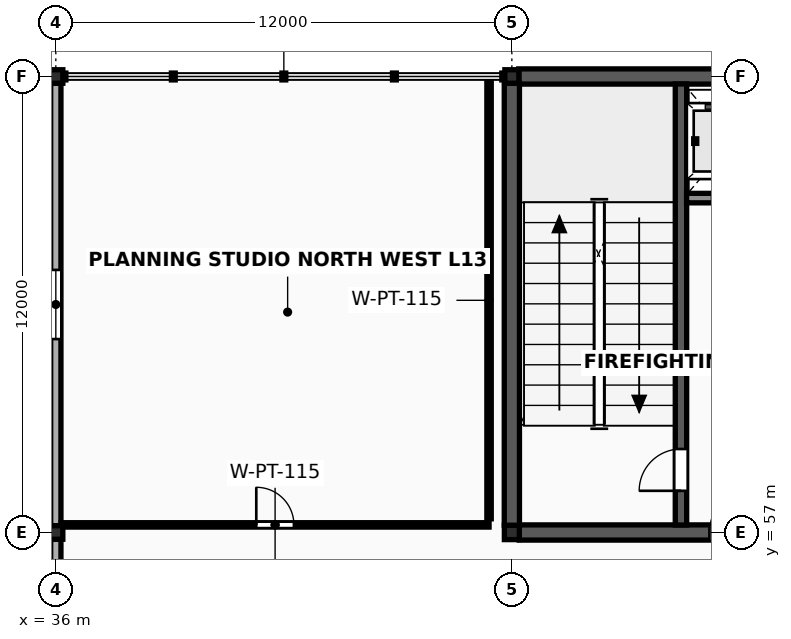
"""IFC4 building model, lengths in metres.
Left out: names, types, materials, properties, quantities, classifications, styles, units other than length and angle.
Written with IfcOpenShell. Run it as: python <this file> out.ifc"""

import sys

from ifc_helpers import new_model, si_unit, direction, frame, frame_2d, origin, origin_2d, place, context, subcontext, project, spatial, rectangle, i_section, extrude, element, fill, save


model = new_model("IFC4")
c1 = context("Model", 3, precision=1e-05, world=origin(), true_north=direction((0.0, 1.0)))
c2 = subcontext(c1, "Body", "Model", "MODEL_VIEW")
j1 = project(units=[si_unit("LENGTHUNIT", "METRE"), si_unit("PLANEANGLEUNIT", "RADIAN")], contexts=[c1])
p1 = place(None, origin())
s1 = spatial("IfcSite", under=j1, at=p1, CompositionType="ELEMENT")
p2 = place(p1, origin())
s2 = spatial("IfcBuilding", under=s1, at=p2, CompositionType="ELEMENT")
p3 = place(p2, frame((0.0, 0.0, 53.6)))
s3 = spatial("IfcBuildingStorey", under=s2, at=p3, CompositionType="ELEMENT", Elevation=53.6)
for number, where, z_axis, x_axis in (
    (1, (36.0, 57.0, 0.0), (0.0, 0.0, 1.0), (1.0, 0.0, 0.0)),
    (2, (36.0, 69.0, 0.0), (0.0, 0.0, 1.0), (1.0, 0.0, 0.0)),
):
    element("IfcColumn", number, at=place(p3, frame(where, z_axis=z_axis, x_axis=x_axis)), inside=s3, PredefinedType="COLUMN", context=c2, shape_type="SweptSolid", body=[
        extrude(i_section(OverallWidth=0.369, OverallDepth=0.356, WebThickness=0.011, FlangeThickness=0.018, FilletRadius=0.018, at=origin_2d()), origin(), (0.0, 0.0, 1.0), 4.0),
    ])
p4 = place(p3, frame((48.0, 57.0, 0.0), z_axis=(0.0, 0.0, 1.0), x_axis=(1.0, 0.0, 0.0)))
e3 = element("IfcColumn", 3, at=p4, inside=s3, PredefinedType="COLUMN", context=c2, shape_type="SweptSolid", body=[
    extrude(i_section(OverallWidth=0.394, OverallDepth=0.375, WebThickness=0.017, FlangeThickness=0.028, FilletRadius=0.018, at=origin_2d()), origin(), (0.0, 0.0, 1.0), 4.0),
])
p5 = place(p3, frame((48.0, 69.0, 0.0), z_axis=(0.0, 0.0, 1.0), x_axis=(1.0, 0.0, 0.0)))
e4 = element("IfcColumn", 4, at=p5, inside=s3, PredefinedType="COLUMN", context=c2, shape_type="SweptSolid", body=[
    extrude(i_section(OverallWidth=0.369, OverallDepth=0.356, WebThickness=0.011, FlangeThickness=0.018, FilletRadius=0.018, at=origin_2d()), origin(), (0.0, 0.0, 1.0), 4.0),
])
p6 = place(p3, frame((48.194, 57.0, 0.0), z_axis=(0.0, 0.0, 1.0), x_axis=(1.0, 0.0, 0.0)))
e5 = element("IfcWall", 5, at=p6, inside=s3, PredefinedType="SHEAR", context=c2, shape_type="SweptSolid", body=[
    extrude(rectangle(XDim=11.612, YDim=0.4, at=frame_2d((5.806, 0.0))), origin(), (0.0, 0.0, 1.0), 3.818),
])
p7 = place(p6, frame((5.006, 0.0, 0.0)))
e6 = element("IfcOpeningElement", 6, at=p7, cuts=e5, PredefinedType="OPENING", context=c2, shape_type="SweptSolid", body=[
    extrude(rectangle(XDim=1.2, YDim=2.2, at=frame_2d((0.6, 1.1))), frame((0.0, 0.215, 0.0), z_axis=(0.0, -1.0, 0.0), x_axis=(1.0, 0.0, 0.0)), (0.0, 0.0, 1.0), 0.43),
])
p8 = place(p6, frame((8.706, 0.0, 0.0)))
e7 = element("IfcOpeningElement", 7, at=p8, cuts=e5, PredefinedType="OPENING", context=c2, shape_type="SweptSolid", body=[
    extrude(rectangle(XDim=1.5, YDim=2.25, at=frame_2d((0.75, 1.125))), frame((0.0, 0.215, 0.0), z_axis=(0.0, -1.0, 0.0), x_axis=(1.0, 0.0, 0.0)), (0.0, 0.0, 1.0), 0.43),
])
p9 = place(p3, frame((48.181, 69.0, 0.0), z_axis=(0.0, 0.0, 1.0), x_axis=(1.0, 0.0, 0.0)))
e8 = element("IfcWall", 8, at=p9, inside=s3, PredefinedType="SHEAR", context=c2, shape_type="SweptSolid", body=[
    extrude(rectangle(XDim=11.637, YDim=0.4, at=frame_2d((5.819, 0.0))), origin(), (0.0, 0.0, 1.0), 3.818),
])
p10 = place(p3, frame((48.0, 57.185, 0.0), z_axis=(0.0, 0.0, 1.0), x_axis=(0.0, 1.0, 0.0)))
e9 = element("IfcWall", 9, at=p10, inside=s3, PredefinedType="SHEAR", context=c2, shape_type="SweptSolid", body=[
    extrude(rectangle(XDim=11.64, YDim=0.4, at=frame_2d((5.82, 0.0))), origin(), (0.0, 0.0, 1.0), 3.818),
])
p11 = place(p3, frame((52.45, 57.197, 0.0), z_axis=(0.0, 0.0, 1.0), x_axis=(0.0, 1.0, 0.0)))
e10 = element("IfcWall", 10, at=p11, inside=s3, PredefinedType="SHEAR", context=c2, shape_type="SweptSolid", body=[
    extrude(rectangle(XDim=11.606, YDim=0.3, at=frame_2d((5.803, 0.0))), origin(), (0.0, 0.0, 1.0), 3.818),
])
p12 = place(p11, frame((0.9, 0.0, 0.0)))
e11 = element("IfcOpeningElement", 11, at=p12, cuts=e10, PredefinedType="OPENING", context=c2, shape_type="SweptSolid", body=[
    extrude(rectangle(XDim=1.1, YDim=2.2, at=frame_2d((0.55, 1.1))), frame((0.0, 0.165, 0.0), z_axis=(0.0, -1.0, 0.0), x_axis=(1.0, 0.0, 0.0)), (0.0, 0.0, 1.0), 0.33),
])
p13 = place(p3, frame((52.597, 65.8, 0.0), z_axis=(0.0, 0.0, 1.0), x_axis=(1.0, 0.0, 0.0)))
e12 = element("IfcWall", 12, at=p13, inside=s3, PredefinedType="SOLIDWALL", context=c2, shape_type="SweptSolid", body=[
    extrude(rectangle(XDim=7.206, YDim=0.25, at=frame_2d((3.603, 0.0))), origin(), (0.0, 0.0, 1.0), 3.818),
])
p14 = place(p13, frame((0.653, 0.0, 0.0)))
e13 = element("IfcOpeningElement", 13, at=p14, cuts=e12, PredefinedType="OPENING", context=c2, shape_type="SweptSolid", body=[
    extrude(rectangle(XDim=1.1, YDim=2.24, at=frame_2d((0.55, 1.12))), frame((0.0, 0.14, 0.0), z_axis=(0.0, -1.0, 0.0), x_axis=(1.0, 0.0, 0.0)), (0.0, 0.0, 1.0), 0.28),
])
p15 = place(p13, frame((3.153, 0.0, 0.0)))
e14 = element("IfcOpeningElement", 14, at=p15, cuts=e12, PredefinedType="OPENING", context=c2, shape_type="SweptSolid", body=[
    extrude(rectangle(XDim=1.05, YDim=2.2, at=frame_2d((0.525, 1.1))), frame((0.0, 0.14, 0.0), z_axis=(0.0, -1.0, 0.0), x_axis=(1.0, 0.0, 0.0)), (0.0, 0.0, 1.0), 0.28),
])
p16 = place(p13, frame((5.528, 0.0, 0.0)))
e15 = element("IfcOpeningElement", 15, at=p16, cuts=e12, PredefinedType="OPENING", context=c2, shape_type="SweptSolid", body=[
    extrude(rectangle(XDim=1.05, YDim=2.2, at=frame_2d((0.525, 1.1))), frame((0.0, 0.14, 0.0), z_axis=(0.0, -1.0, 0.0), x_axis=(1.0, 0.0, 0.0)), (0.0, 0.0, 1.0), 0.28),
])
p17 = place(p3, frame((36.0, 45.176, 0.0), z_axis=(0.0, 0.0, 1.0), x_axis=(0.0, 1.0, 0.0)))
e16 = element("IfcWall", 16, at=p17, inside=s3, PredefinedType="SOLIDWALL", context=c2, shape_type="SweptSolid", body=[
    extrude(rectangle(XDim=11.648, YDim=0.27, at=frame_2d((5.824, 0.0))), origin(), (0.0, 0.0, 1.0), 3.271),
])
p18 = place(p17, frame((4.994, 0.0, 0.78)))
e17 = element("IfcOpeningElement", 17, at=p18, cuts=e16, PredefinedType="OPENING", context=c2, shape_type="SweptSolid", body=[
    extrude(rectangle(XDim=1.66, YDim=1.58, at=frame_2d((0.83, 0.79))), frame((0.0, 0.15, 0.0), z_axis=(0.0, -1.0, 0.0), x_axis=(1.0, 0.0, 0.0)), (0.0, 0.0, 1.0), 0.3),
])
p19 = place(p3, frame((36.0, 57.176, 0.0), z_axis=(0.0, 0.0, 1.0), x_axis=(0.0, 1.0, 0.0)))
e18 = element("IfcWall", 18, at=p19, inside=s3, PredefinedType="SOLIDWALL", context=c2, shape_type="SweptSolid", body=[
    extrude(rectangle(XDim=11.648, YDim=0.27, at=frame_2d((5.824, 0.0))), origin(), (0.0, 0.0, 1.0), 3.271),
])
p20 = place(p19, frame((4.914, 0.0, 0.78)))
e19 = element("IfcOpeningElement", 19, at=p20, cuts=e18, PredefinedType="OPENING", context=c2, shape_type="SweptSolid", body=[
    extrude(rectangle(XDim=1.82, YDim=1.58, at=frame_2d((0.91, 0.79))), frame((0.0, 0.15, 0.0), z_axis=(0.0, -1.0, 0.0), x_axis=(1.0, 0.0, 0.0)), (0.0, 0.0, 1.0), 0.3),
])
p21 = place(p3, frame((36.14, 57.2, 0.0), z_axis=(0.0, 0.0, 1.0), x_axis=(1.0, 0.0, 0.0)))
e20 = element("IfcWall", 20, at=p21, inside=s3, PredefinedType="PARTITIONING", context=c2, shape_type="SweptSolid", body=[
    extrude(rectangle(XDim=11.26, YDim=0.115, at=frame_2d((5.63, 0.0))), origin(), (0.0, 0.0, 1.0), 2.88),
])
p22 = place(p21, frame((5.135, 0.0, 0.0)))
e21 = element("IfcOpeningElement", 21, at=p22, cuts=e20, PredefinedType="OPENING", context=c2, shape_type="SweptSolid", body=[
    extrude(rectangle(XDim=0.99, YDim=2.15, at=frame_2d((0.495, 1.075))), frame((0.0, 0.073, 0.0), z_axis=(0.0, -1.0, 0.0), x_axis=(1.0, 0.0, 0.0)), (0.0, 0.0, 1.0), 0.145),
])
p23 = place(p3, frame((47.4, 57.36, 0.0), z_axis=(0.0, 0.0, 1.0), x_axis=(0.0, 1.0, 0.0)))
e22 = element("IfcWall", 22, at=p23, inside=s3, PredefinedType="PARTITIONING", context=c2, shape_type="SweptSolid", body=[
    extrude(rectangle(XDim=11.5, YDim=0.115, at=frame_2d((5.75, 0.0))), origin(), (0.0, 0.0, 1.0), 2.88),
])
p24 = place(p20, origin())
e23 = element("IfcWindow", 23, at=p24, inside=s3, PartitioningType="DOUBLE_PANEL_VERTICAL", PredefinedType="WINDOW", context=c2, shape_type="SweptSolid", body=[
    extrude(rectangle(XDim=1.82, YDim=1.58, at=frame_2d((0.91, 0.79))), frame((0.0, 0.03, 0.0), z_axis=(0.0, -1.0, 0.0), x_axis=(1.0, 0.0, 0.0)), (0.0, 0.0, 1.0), 0.06),
])
fill(e19, e23)
p25 = place(p12, origin())
e24 = element("IfcDoor", 24, at=p25, inside=s3, OperationType="SINGLE_SWING_LEFT", PredefinedType="DOOR", context=c2, shape_type="SweptSolid", body=[
    extrude(rectangle(XDim=1.1, YDim=2.2, at=frame_2d((0.55, 1.1))), frame((0.0, 0.025, 0.0), z_axis=(0.0, -1.0, 0.0), x_axis=(1.0, 0.0, 0.0)), (0.0, 0.0, 1.0), 0.05),
])
fill(e11, e24)
p26 = place(p7, origin())
e25 = element("IfcDoor", 25, at=p26, inside=s3, OperationType="SINGLE_SWING_RIGHT", PredefinedType="DOOR", context=c2, shape_type="SweptSolid", body=[
    extrude(rectangle(XDim=1.2, YDim=2.2, at=frame_2d((0.6, 1.1))), frame((0.0, 0.025, 0.0), z_axis=(0.0, -1.0, 0.0), x_axis=(1.0, 0.0, 0.0)), (0.0, 0.0, 1.0), 0.05),
])
fill(e6, e25)
p27 = place(p22, origin())
e26 = element("IfcDoor", 26, at=p27, inside=s3, OperationType="SINGLE_SWING_LEFT", PredefinedType="DOOR", context=c2, shape_type="SweptSolid", body=[
    extrude(rectangle(XDim=0.99, YDim=2.15, at=frame_2d((0.495, 1.075))), frame((0.0, 0.025, 0.0), z_axis=(0.0, -1.0, 0.0), x_axis=(1.0, 0.0, 0.0)), (0.0, 0.0, 1.0), 0.05),
])
fill(e21, e26)
save(model, sys.argv[1])
